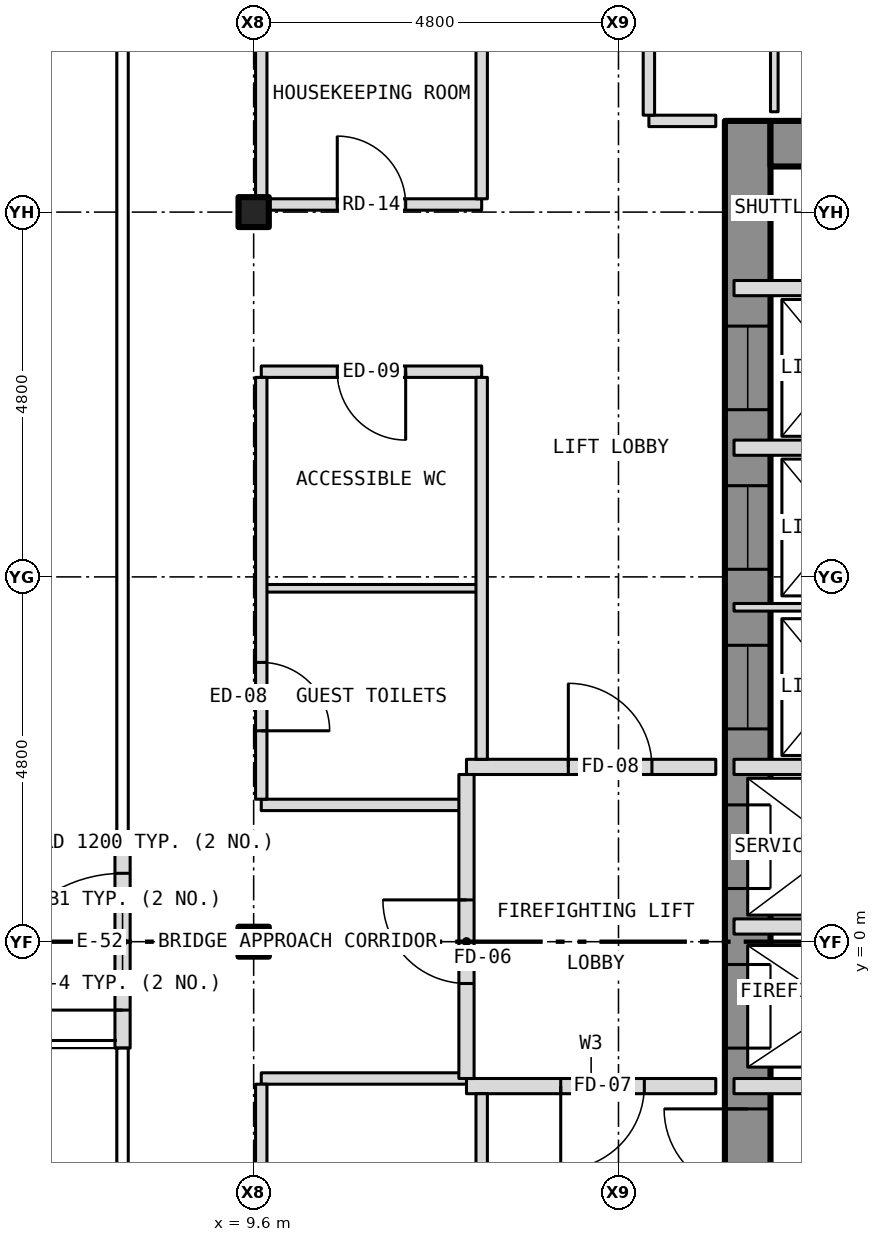
"""IFC4 building model, lengths in metres.
Left out: names, types, materials, properties, quantities, classifications, styles, units other than length and angle.
Written with IfcOpenShell. Run it as: python <this file> out.ifc"""

import sys

from ifc_helpers import new_model, si_unit, direction, frame, frame_2d, origin, origin_2d, place, context, subcontext, project, spatial, rectangle, i_section, extrude, element, fill, save


model = new_model("IFC4")
c1 = context("Model", 3, precision=1e-05, world=origin(), true_north=direction((0.0, 1.0)))
c2 = subcontext(c1, "Body", "Model", "MODEL_VIEW")
j1 = project(units=[si_unit("LENGTHUNIT", "METRE"), si_unit("PLANEANGLEUNIT", "RADIAN")], contexts=[c1])
p1 = place(None, origin())
s1 = spatial("IfcSite", under=j1, at=p1, CompositionType="ELEMENT")
p2 = place(p1, origin())
s2 = spatial("IfcBuilding", under=s1, at=p2, CompositionType="ELEMENT")
p3 = place(p2, frame((0.0, 0.0, 131.0)))
s3 = spatial("IfcBuildingStorey", under=s2, at=p3, CompositionType="ELEMENT", Elevation=131.0)
for number, where, z_axis, x_axis in (
    (1, (9.6, 0.0, -0.15), (0.0, 0.0, 1.0), (1.0, 0.0, 0.0)),
    (2, (9.6, 9.6, -0.15), (0.0, 0.0, 1.0), (1.0, 0.0, 0.0)),
):
    element("IfcColumn", number, at=place(p3, frame(where, z_axis=z_axis, x_axis=x_axis)), inside=s3, PredefinedType="COLUMN", context=c2, shape_type="SweptSolid", body=[
        extrude(i_section(OverallWidth=0.399, OverallDepth=0.394, WebThickness=0.023, FlangeThickness=0.037, at=origin_2d()), origin(), (0.0, 0.0, 1.0), 3.5),
    ])
p4 = place(p3, frame((16.1, -10.8, 0.0), z_axis=(0.0, 0.0, 1.0), x_axis=(0.0, 1.0, 0.0)))
e3 = element("IfcWall", 3, at=p4, inside=s3, PredefinedType="SHEAR", context=c2, shape_type="SweptSolid", body=[
    extrude(rectangle(XDim=21.6, YDim=0.6, at=frame_2d((10.8, 0.0))), origin(), (0.0, 0.0, 1.0), 3.25),
])
p5 = place(p4, frame((9.4, 0.0, 0.0)))
e4 = element("IfcOpeningElement", 4, at=p5, cuts=e3, PredefinedType="OPENING", context=c2, shape_type="SweptSolid", body=[
    extrude(rectangle(XDim=1.1, YDim=2.1, at=frame_2d((0.55, 1.05))), frame((0.0, 0.312, 0.0), z_axis=(0.0, -1.0, 0.0), x_axis=(1.0, 0.0, 0.0)), (0.0, 0.0, 1.0), 0.624),
])
p6 = place(p4, frame((11.5, 0.0, 0.0)))
e5 = element("IfcOpeningElement", 5, at=p6, cuts=e3, PredefinedType="OPENING", context=c2, shape_type="SweptSolid", body=[
    extrude(rectangle(XDim=1.1, YDim=2.1, at=frame_2d((0.55, 1.05))), frame((0.0, 0.312, 0.0), z_axis=(0.0, -1.0, 0.0), x_axis=(1.0, 0.0, 0.0)), (0.0, 0.0, 1.0), 0.624),
])
p7 = place(p4, frame((13.6, 0.0, 0.0)))
e6 = element("IfcOpeningElement", 6, at=p7, cuts=e3, PredefinedType="OPENING", context=c2, shape_type="SweptSolid", body=[
    extrude(rectangle(XDim=1.1, YDim=2.1, at=frame_2d((0.55, 1.05))), frame((0.0, 0.312, 0.0), z_axis=(0.0, -1.0, 0.0), x_axis=(1.0, 0.0, 0.0)), (0.0, 0.0, 1.0), 0.624),
])
p8 = place(p4, frame((15.7, 0.0, 0.0)))
e7 = element("IfcOpeningElement", 7, at=p8, cuts=e3, PredefinedType="OPENING", context=c2, shape_type="SweptSolid", body=[
    extrude(rectangle(XDim=1.1, YDim=2.1, at=frame_2d((0.55, 1.05))), frame((0.0, 0.312, 0.0), z_axis=(0.0, -1.0, 0.0), x_axis=(1.0, 0.0, 0.0)), (0.0, 0.0, 1.0), 0.624),
])
p9 = place(p4, frame((17.8, 0.0, 0.0)))
e8 = element("IfcOpeningElement", 8, at=p9, cuts=e3, PredefinedType="OPENING", context=c2, shape_type="SweptSolid", body=[
    extrude(rectangle(XDim=1.1, YDim=2.1, at=frame_2d((0.55, 1.05))), frame((0.0, 0.312, 0.0), z_axis=(0.0, -1.0, 0.0), x_axis=(1.0, 0.0, 0.0)), (0.0, 0.0, 1.0), 0.624),
])
p10 = place(p4, frame((5.642, 0.0, 0.0)))
e9 = element("IfcOpeningElement", 9, at=p10, cuts=e3, PredefinedType="OPENING", context=c2, shape_type="SweptSolid", body=[
    extrude(rectangle(XDim=1.1, YDim=2.1, at=frame_2d((0.55, 1.05))), frame((0.0, 0.312, 0.0), z_axis=(0.0, -1.0, 0.0), x_axis=(1.0, 0.0, 0.0)), (0.0, 0.0, 1.0), 0.624),
])
p11 = place(p4, frame((7.5, 0.0, 0.0)))
e10 = element("IfcOpeningElement", 10, at=p11, cuts=e3, PredefinedType="OPENING", context=c2, shape_type="SweptSolid", body=[
    extrude(rectangle(XDim=1.1, YDim=2.1, at=frame_2d((0.55, 1.05))), frame((0.0, 0.312, 0.0), z_axis=(0.0, -1.0, 0.0), x_axis=(1.0, 0.0, 0.0)), (0.0, 0.0, 1.0), 0.624),
])
p12 = place(p3, frame((16.4, 10.5, 0.0), z_axis=(0.0, 0.0, 1.0), x_axis=(1.0, 0.0, 0.0)))
e11 = element("IfcWall", 11, at=p12, inside=s3, PredefinedType="SHEAR", context=c2, shape_type="SweptSolid", body=[
    extrude(rectangle(XDim=5.8, YDim=0.6, at=frame_2d((2.9, 0.0))), origin(), (0.0, 0.0, 1.0), 3.25),
])
p13 = place(p3, frame((7.875, -1.4, 0.0), z_axis=(0.0, 0.0, 1.0), x_axis=(0.0, 1.0, 0.0)))
e12 = element("IfcWall", 12, at=p13, inside=s3, PredefinedType="SOLIDWALL", context=c2, shape_type="SweptSolid", body=[
    extrude(rectangle(XDim=2.8, YDim=0.2, at=frame_2d((1.4, 0.0))), origin(), (0.0, 0.0, 1.0), 3.5),
])
p14 = place(p13, frame((0.5, 0.0, 0.0)))
e13 = element("IfcOpeningElement", 13, at=p14, cuts=e12, PredefinedType="OPENING", context=c2, shape_type="SweptSolid", body=[
    extrude(rectangle(XDim=1.8, YDim=2.1, at=frame_2d((0.9, 1.05))), frame((0.0, 0.112, 0.0), z_axis=(0.0, -1.0, 0.0), x_axis=(1.0, 0.0, 0.0)), (0.0, 0.0, 1.0), 0.224),
])
p15 = place(p3, frame((12.4, -1.9, 0.0), z_axis=(0.0, 0.0, 1.0), x_axis=(1.0, 0.0, 0.0)))
e14 = element("IfcWall", 14, at=p15, inside=s3, PredefinedType="PARTITIONING", context=c2, shape_type="SweptSolid", body=[
    extrude(rectangle(XDim=3.28, YDim=0.2, at=frame_2d((1.64, 0.0))), origin(), (0.0, 0.0, 1.0), 3.35),
])
p16 = place(p15, frame((1.24, 0.0, 0.0)))
e15 = element("IfcOpeningElement", 15, at=p16, cuts=e14, PredefinedType="OPENING", context=c2, shape_type="SweptSolid", body=[
    extrude(rectangle(XDim=1.1, YDim=2.1, at=frame_2d((0.55, 1.05))), frame((0.0, 0.112, 0.0), z_axis=(0.0, -1.0, 0.0), x_axis=(1.0, 0.0, 0.0)), (0.0, 0.0, 1.0), 0.224),
])
p17 = place(p3, frame((15.92, -1.9, 0.0), z_axis=(0.0, 0.0, 1.0), x_axis=(1.0, 0.0, 0.0)))
e16 = element("IfcWall", 16, at=p17, inside=s3, PredefinedType="PARTITIONING", context=c2, shape_type="SweptSolid", body=[
    extrude(rectangle(XDim=6.76, YDim=0.2, at=frame_2d((3.38, 0.0))), origin(), (0.0, 0.0, 1.0), 3.25),
])
p18 = place(p17, frame((3.74, 0.0, 0.0)))
e17 = element("IfcOpeningElement", 17, at=p18, cuts=e16, PredefinedType="OPENING", context=c2, shape_type="SweptSolid", body=[
    extrude(rectangle(XDim=0.9, YDim=2.1, at=frame_2d((0.45, 1.05))), frame((0.0, 0.112, 0.0), z_axis=(0.0, -1.0, 0.0), x_axis=(1.0, 0.0, 0.0)), (0.0, 0.0, 1.0), 0.224),
])
p19 = place(p3, frame((9.7, -1.8, 0.0), z_axis=(0.0, 0.0, 1.0), x_axis=(1.0, 0.0, 0.0)))
e18 = element("IfcWall", 18, at=p19, inside=s3, PredefinedType="PARTITIONING", context=c2, shape_type="SweptSolid", body=[
    extrude(rectangle(XDim=2.7, YDim=0.15, at=frame_2d((1.35, 0.0))), origin(), (0.0, 0.0, 1.0), 3.35),
])
p20 = place(p3, frame((15.92, 0.2, 0.0), z_axis=(0.0, 0.0, 1.0), x_axis=(1.0, 0.0, 0.0)))
e19 = element("IfcWall", 19, at=p20, inside=s3, PredefinedType="PARTITIONING", context=c2, shape_type="SweptSolid", body=[
    extrude(rectangle(XDim=2.88, YDim=0.2, at=frame_2d((1.44, 0.0))), origin(), (0.0, 0.0, 1.0), 3.25),
])
p21 = place(p3, frame((9.7, 1.8, 0.0), z_axis=(0.0, 0.0, 1.0), x_axis=(1.0, 0.0, 0.0)))
e20 = element("IfcWall", 20, at=p21, inside=s3, PredefinedType="PARTITIONING", context=c2, shape_type="SweptSolid", body=[
    extrude(rectangle(XDim=2.7, YDim=0.15, at=frame_2d((1.35, 0.0))), origin(), (0.0, 0.0, 1.0), 3.35),
])
p22 = place(p3, frame((12.4, 2.3, 0.0), z_axis=(0.0, 0.0, 1.0), x_axis=(1.0, 0.0, 0.0)))
e21 = element("IfcWall", 21, at=p22, inside=s3, PredefinedType="PARTITIONING", context=c2, shape_type="SweptSolid", body=[
    extrude(rectangle(XDim=3.28, YDim=0.2, at=frame_2d((1.64, 0.0))), origin(), (0.0, 0.0, 1.0), 3.35),
])
p23 = place(p22, frame((1.34, 0.0, 0.0)))
e22 = element("IfcOpeningElement", 22, at=p23, cuts=e21, PredefinedType="OPENING", context=c2, shape_type="SweptSolid", body=[
    extrude(rectangle(XDim=1.1, YDim=2.1, at=frame_2d((0.55, 1.05))), frame((0.0, 0.112, 0.0), z_axis=(0.0, -1.0, 0.0), x_axis=(1.0, 0.0, 0.0)), (0.0, 0.0, 1.0), 0.224),
])
p24 = place(p3, frame((15.92, 2.3, 0.0), z_axis=(0.0, 0.0, 1.0), x_axis=(1.0, 0.0, 0.0)))
e23 = element("IfcWall", 23, at=p24, inside=s3, PredefinedType="PARTITIONING", context=c2, shape_type="SweptSolid", body=[
    extrude(rectangle(XDim=2.88, YDim=0.2, at=frame_2d((1.44, 0.0))), origin(), (0.0, 0.0, 1.0), 3.25),
])
p25 = place(p3, frame((15.92, 4.4, 0.0), z_axis=(0.0, 0.0, 1.0), x_axis=(1.0, 0.0, 0.0)))
e24 = element("IfcWall", 24, at=p25, inside=s3, PredefinedType="PARTITIONING", context=c2, shape_type="SweptSolid", body=[
    extrude(rectangle(XDim=6.76, YDim=0.1, at=frame_2d((3.38, 0.0))), origin(), (0.0, 0.0, 1.0), 3.25),
])
p26 = place(p25, frame((4.43, 0.0, 0.0)))
e25 = element("IfcOpeningElement", 25, at=p26, cuts=e24, PredefinedType="OPENING", context=c2, shape_type="SweptSolid", body=[
    extrude(rectangle(XDim=0.9, YDim=2.1, at=frame_2d((0.45, 1.05))), frame((0.0, 0.062, 0.0), z_axis=(0.0, -1.0, 0.0), x_axis=(1.0, 0.0, 0.0)), (0.0, 0.0, 1.0), 0.124),
])
p27 = place(p3, frame((9.7, 4.65, 0.0), z_axis=(0.0, 0.0, 1.0), x_axis=(1.0, 0.0, 0.0)))
e26 = element("IfcWall", 26, at=p27, inside=s3, PredefinedType="PARTITIONING", context=c2, shape_type="SweptSolid", body=[
    extrude(rectangle(XDim=2.9, YDim=0.1, at=frame_2d((1.45, 0.0))), origin(), (0.0, 0.0, 1.0), 3.35),
])
p28 = place(p3, frame((15.92, 6.5, 0.0), z_axis=(0.0, 0.0, 1.0), x_axis=(1.0, 0.0, 0.0)))
e27 = element("IfcWall", 27, at=p28, inside=s3, PredefinedType="PARTITIONING", context=c2, shape_type="SweptSolid", body=[
    extrude(rectangle(XDim=2.88, YDim=0.2, at=frame_2d((1.44, 0.0))), origin(), (0.0, 0.0, 1.0), 3.25),
])
p29 = place(p3, frame((9.7, 7.5, 0.0), z_axis=(0.0, 0.0, 1.0), x_axis=(1.0, 0.0, 0.0)))
e28 = element("IfcWall", 28, at=p29, inside=s3, PredefinedType="PARTITIONING", context=c2, shape_type="SweptSolid", body=[
    extrude(rectangle(XDim=2.9, YDim=0.15, at=frame_2d((1.45, 0.0))), origin(), (0.0, 0.0, 1.0), 3.35),
])
p30 = place(p29, frame((1.0, 0.0, 0.0)))
e29 = element("IfcOpeningElement", 29, at=p30, cuts=e28, PredefinedType="OPENING", context=c2, shape_type="SweptSolid", body=[
    extrude(rectangle(XDim=0.9, YDim=2.1, at=frame_2d((0.45, 1.05))), frame((0.0, 0.087, 0.0), z_axis=(0.0, -1.0, 0.0), x_axis=(1.0, 0.0, 0.0)), (0.0, 0.0, 1.0), 0.174),
])
p31 = place(p3, frame((15.92, 8.6, 0.0), z_axis=(0.0, 0.0, 1.0), x_axis=(1.0, 0.0, 0.0)))
e30 = element("IfcWall", 30, at=p31, inside=s3, PredefinedType="PARTITIONING", context=c2, shape_type="SweptSolid", body=[
    extrude(rectangle(XDim=2.88, YDim=0.2, at=frame_2d((1.44, 0.0))), origin(), (0.0, 0.0, 1.0), 3.25),
])
p32 = place(p3, frame((9.7, 9.7, 0.0), z_axis=(0.0, 0.0, 1.0), x_axis=(1.0, 0.0, 0.0)))
e31 = element("IfcWall", 31, at=p32, inside=s3, PredefinedType="PARTITIONING", context=c2, shape_type="SweptSolid", body=[
    extrude(rectangle(XDim=2.9, YDim=0.15, at=frame_2d((1.45, 0.0))), origin(), (0.0, 0.0, 1.0), 2.728),
])
p33 = place(p32, frame((1.0, 0.0, 0.0)))
e32 = element("IfcOpeningElement", 32, at=p33, cuts=e31, PredefinedType="OPENING", context=c2, shape_type="SweptSolid", body=[
    extrude(rectangle(XDim=0.9, YDim=2.1, at=frame_2d((0.45, 1.05))), frame((0.0, 0.087, 0.0), z_axis=(0.0, -1.0, 0.0), x_axis=(1.0, 0.0, 0.0)), (0.0, 0.0, 1.0), 0.174),
])
p34 = place(p3, frame((14.8, 10.8, 0.0), z_axis=(0.0, 0.0, 1.0), x_axis=(1.0, 0.0, 0.0)))
e33 = element("IfcWall", 33, at=p34, inside=s3, PredefinedType="PARTITIONING", context=c2, shape_type="SweptSolid", body=[
    extrude(rectangle(XDim=0.88, YDim=0.15, at=frame_2d((0.44, 0.0))), origin(), (0.0, 0.0, 1.0), 3.35),
])
p35 = place(p3, frame((9.7, -9.401, 0.0), z_axis=(0.0, 0.0, 1.0), x_axis=(0.0, 1.0, 0.0)))
e34 = element("IfcWall", 34, at=p35, inside=s3, PredefinedType="PARTITIONING", context=c2, shape_type="SweptSolid", body=[
    extrude(rectangle(XDim=7.526, YDim=0.15, at=frame_2d((3.763, 0.0))), origin(), (0.0, 0.0, 1.0), 2.728),
])
p36 = place(p35, frame((1.751, 0.0, 0.0)))
e35 = element("IfcOpeningElement", 35, at=p36, cuts=e34, PredefinedType="OPENING", context=c2, shape_type="SweptSolid", body=[
    extrude(rectangle(XDim=0.9, YDim=2.1, at=frame_2d((0.45, 1.05))), frame((0.0, 0.087, 0.0), z_axis=(0.0, -1.0, 0.0), x_axis=(1.0, 0.0, 0.0)), (0.0, 0.0, 1.0), 0.174),
])
p37 = place(p3, frame((9.7, 1.875, 0.0), z_axis=(0.0, 0.0, 1.0), x_axis=(0.0, 1.0, 0.0)))
e36 = element("IfcWall", 36, at=p37, inside=s3, PredefinedType="PARTITIONING", context=c2, shape_type="SweptSolid", body=[
    extrude(rectangle(XDim=5.55, YDim=0.15, at=frame_2d((2.775, 0.0))), origin(), (0.0, 0.0, 1.0), 2.728),
])
p38 = place(p37, frame((0.9, 0.0, 0.0)))
e37 = element("IfcOpeningElement", 37, at=p38, cuts=e36, PredefinedType="OPENING", context=c2, shape_type="SweptSolid", body=[
    extrude(rectangle(XDim=0.9, YDim=2.1, at=frame_2d((0.45, 1.05))), frame((0.0, 0.087, 0.0), z_axis=(0.0, -1.0, 0.0), x_axis=(1.0, 0.0, 0.0)), (0.0, 0.0, 1.0), 0.174),
])
p39 = place(p3, frame((9.7, 9.775, 0.0), z_axis=(0.0, 0.0, 1.0), x_axis=(0.0, 1.0, 0.0)))
e38 = element("IfcWall", 38, at=p39, inside=s3, PredefinedType="PARTITIONING", context=c2, shape_type="SweptSolid", body=[
    extrude(rectangle(XDim=2.75, YDim=0.15, at=frame_2d((1.375, 0.0))), origin(), (0.0, 0.0, 1.0), 2.728),
])
p40 = place(p3, frame((12.4, -1.8, 0.0), z_axis=(0.0, 0.0, 1.0), x_axis=(0.0, 1.0, 0.0)))
e39 = element("IfcWall", 39, at=p40, inside=s3, PredefinedType="PARTITIONING", context=c2, shape_type="SweptSolid", body=[
    extrude(rectangle(XDim=4.0, YDim=0.2, at=frame_2d((2.0, 0.0))), origin(), (0.0, 0.0, 1.0), 3.35),
])
p41 = place(p40, frame((1.25, 0.0, 0.0)))
e40 = element("IfcOpeningElement", 40, at=p41, cuts=e39, PredefinedType="OPENING", context=c2, shape_type="SweptSolid", body=[
    extrude(rectangle(XDim=1.1, YDim=2.1, at=frame_2d((0.55, 1.05))), frame((0.0, 0.112, 0.0), z_axis=(0.0, -1.0, 0.0), x_axis=(1.0, 0.0, 0.0)), (0.0, 0.0, 1.0), 0.224),
])
p42 = place(p3, frame((12.6, -12.525, 0.0), z_axis=(0.0, 0.0, 1.0), x_axis=(0.0, 1.0, 0.0)))
e41 = element("IfcWall", 41, at=p42, inside=s3, PredefinedType="PARTITIONING", context=c2, shape_type="SweptSolid", body=[
    extrude(rectangle(XDim=10.525, YDim=0.15, at=frame_2d((5.262, 0.0))), origin(), (0.0, 0.0, 1.0), 3.35),
])
p43 = place(p3, frame((12.6, 2.4, 0.0), z_axis=(0.0, 0.0, 1.0), x_axis=(0.0, 1.0, 0.0)))
e42 = element("IfcWall", 42, at=p43, inside=s3, PredefinedType="PARTITIONING", context=c2, shape_type="SweptSolid", body=[
    extrude(rectangle(XDim=5.025, YDim=0.15, at=frame_2d((2.513, 0.0))), origin(), (0.0, 0.0, 1.0), 3.35),
])
p44 = place(p3, frame((12.6, 9.775, 0.0), z_axis=(0.0, 0.0, 1.0), x_axis=(0.0, 1.0, 0.0)))
e43 = element("IfcWall", 43, at=p44, inside=s3, PredefinedType="PARTITIONING", context=c2, shape_type="SweptSolid", body=[
    extrude(rectangle(XDim=2.75, YDim=0.15, at=frame_2d((1.375, 0.0))), origin(), (0.0, 0.0, 1.0), 3.35),
])
p45 = place(p3, frame((14.8, 10.875, 0.0), z_axis=(0.0, 0.0, 1.0), x_axis=(0.0, 1.0, 0.0)))
e44 = element("IfcWall", 44, at=p45, inside=s3, PredefinedType="PARTITIONING", context=c2, shape_type="SweptSolid", body=[
    extrude(rectangle(XDim=3.85, YDim=0.15, at=frame_2d((1.925, 0.0))), origin(), (0.0, 0.0, 1.0), 3.35),
])
p46 = place(p45, frame((2.325, 0.0, 0.0)))
e45 = element("IfcOpeningElement", 45, at=p46, cuts=e44, PredefinedType="OPENING", context=c2, shape_type="SweptSolid", body=[
    extrude(rectangle(XDim=1.0, YDim=2.1, at=frame_2d((0.5, 1.05))), frame((0.0, 0.087, 0.0), z_axis=(0.0, -1.0, 0.0), x_axis=(1.0, 0.0, 0.0)), (0.0, 0.0, 1.0), 0.174),
])
p47 = place(p3, frame((16.45, 10.92, 0.0), z_axis=(0.0, 0.0, 1.0), x_axis=(0.0, 1.0, 0.0)))
e46 = element("IfcWall", 46, at=p47, inside=s3, PredefinedType="PARTITIONING", context=c2, shape_type="SweptSolid", body=[
    extrude(rectangle(XDim=12.36, YDim=0.1, at=frame_2d((6.18, 0.0))), origin(), (0.0, 0.0, 1.0), 3.35),
])
p48 = place(p47, frame((5.43, 0.0, 0.0)))
e47 = element("IfcOpeningElement", 47, at=p48, cuts=e46, PredefinedType="OPENING", context=c2, shape_type="SweptSolid", body=[
    extrude(rectangle(XDim=0.9, YDim=2.1, at=frame_2d((0.45, 1.05))), frame((0.0, 0.062, 0.0), z_axis=(0.0, -1.0, 0.0), x_axis=(1.0, 0.0, 0.0)), (0.0, 0.0, 1.0), 0.124),
])
p49 = place(p14, origin())
e48 = element("IfcDoor", 48, at=p49, inside=s3, OperationType="DOUBLE_DOOR_DOUBLE_SWING", PredefinedType="DOOR", context=c2, shape_type="SweptSolid", body=[
    extrude(rectangle(XDim=1.8, YDim=2.1, at=frame_2d((0.9, 1.05))), frame((0.0, 0.025, 0.0), z_axis=(0.0, -1.0, 0.0), x_axis=(1.0, 0.0, 0.0)), (0.0, 0.0, 1.0), 0.05),
])
fill(e13, e48)
p50 = place(p5, origin())
e49 = element("IfcDoor", 49, at=p50, inside=s3, OperationType="SLIDING_TO_LEFT", PredefinedType="DOOR", context=c2, shape_type="SweptSolid", body=[
    extrude(rectangle(XDim=1.1, YDim=2.1, at=frame_2d((0.55, 1.05))), frame((0.0, 0.025, 0.0), z_axis=(0.0, -1.0, 0.0), x_axis=(1.0, 0.0, 0.0)), (0.0, 0.0, 1.0), 0.05),
])
fill(e4, e49)
p51 = place(p6, origin())
e50 = element("IfcDoor", 50, at=p51, inside=s3, OperationType="SLIDING_TO_LEFT", PredefinedType="DOOR", context=c2, shape_type="SweptSolid", body=[
    extrude(rectangle(XDim=1.1, YDim=2.1, at=frame_2d((0.55, 1.05))), frame((0.0, 0.025, 0.0), z_axis=(0.0, -1.0, 0.0), x_axis=(1.0, 0.0, 0.0)), (0.0, 0.0, 1.0), 0.05),
])
fill(e5, e50)
p52 = place(p7, origin())
e51 = element("IfcDoor", 51, at=p52, inside=s3, OperationType="SLIDING_TO_LEFT", PredefinedType="DOOR", context=c2, shape_type="SweptSolid", body=[
    extrude(rectangle(XDim=1.1, YDim=2.1, at=frame_2d((0.55, 1.05))), frame((0.0, 0.025, 0.0), z_axis=(0.0, -1.0, 0.0), x_axis=(1.0, 0.0, 0.0)), (0.0, 0.0, 1.0), 0.05),
])
fill(e6, e51)
p53 = place(p8, origin())
e52 = element("IfcDoor", 52, at=p53, inside=s3, OperationType="SLIDING_TO_LEFT", PredefinedType="DOOR", context=c2, shape_type="SweptSolid", body=[
    extrude(rectangle(XDim=1.1, YDim=2.1, at=frame_2d((0.55, 1.05))), frame((0.0, 0.025, 0.0), z_axis=(0.0, -1.0, 0.0), x_axis=(1.0, 0.0, 0.0)), (0.0, 0.0, 1.0), 0.05),
])
fill(e7, e52)
p54 = place(p9, origin())
e53 = element("IfcDoor", 53, at=p54, inside=s3, OperationType="SLIDING_TO_LEFT", PredefinedType="DOOR", context=c2, shape_type="SweptSolid", body=[
    extrude(rectangle(XDim=1.1, YDim=2.1, at=frame_2d((0.55, 1.05))), frame((0.0, 0.025, 0.0), z_axis=(0.0, -1.0, 0.0), x_axis=(1.0, 0.0, 0.0)), (0.0, 0.0, 1.0), 0.05),
])
fill(e8, e53)
p55 = place(p11, origin())
e54 = element("IfcDoor", 54, at=p55, inside=s3, OperationType="SINGLE_SWING_RIGHT", PredefinedType="DOOR", context=c2, shape_type="SweptSolid", body=[
    extrude(rectangle(XDim=1.1, YDim=2.1, at=frame_2d((0.55, 1.05))), frame((0.0, 0.025, 0.0), z_axis=(0.0, -1.0, 0.0), x_axis=(1.0, 0.0, 0.0)), (0.0, 0.0, 1.0), 0.05),
])
fill(e10, e54)
p56 = place(p41, origin())
e55 = element("IfcDoor", 55, at=p56, inside=s3, OperationType="SINGLE_SWING_RIGHT", PredefinedType="DOOR", context=c2, shape_type="SweptSolid", body=[
    extrude(rectangle(XDim=1.1, YDim=2.1, at=frame_2d((0.55, 1.05))), frame((0.0, 0.025, 0.0), z_axis=(0.0, -1.0, 0.0), x_axis=(1.0, 0.0, 0.0)), (0.0, 0.0, 1.0), 0.05),
])
fill(e40, e55)
p57 = place(p16, origin())
e56 = element("IfcDoor", 56, at=p57, inside=s3, OperationType="SINGLE_SWING_LEFT", PredefinedType="DOOR", context=c2, shape_type="SweptSolid", body=[
    extrude(rectangle(XDim=1.1, YDim=2.1, at=frame_2d((0.55, 1.05))), frame((0.0, 0.025, 0.0), z_axis=(0.0, -1.0, 0.0), x_axis=(1.0, 0.0, 0.0)), (0.0, 0.0, 1.0), 0.05),
])
fill(e15, e56)
p58 = place(p23, origin())
e57 = element("IfcDoor", 57, at=p58, inside=s3, OperationType="SINGLE_SWING_LEFT", PredefinedType="DOOR", context=c2, shape_type="SweptSolid", body=[
    extrude(rectangle(XDim=1.1, YDim=2.1, at=frame_2d((0.55, 1.05))), frame((0.0, 0.025, 0.0), z_axis=(0.0, -1.0, 0.0), x_axis=(1.0, 0.0, 0.0)), (0.0, 0.0, 1.0), 0.05),
])
fill(e22, e57)
p59 = place(p33, origin())
e58 = element("IfcDoor", 58, at=p59, inside=s3, OperationType="SINGLE_SWING_LEFT", PredefinedType="DOOR", context=c2, shape_type="SweptSolid", body=[
    extrude(rectangle(XDim=0.9, YDim=2.1, at=frame_2d((0.45, 1.05))), frame((0.0, 0.025, 0.0), z_axis=(0.0, -1.0, 0.0), x_axis=(1.0, 0.0, 0.0)), (0.0, 0.0, 1.0), 0.05),
])
fill(e32, e58)
p60 = place(p38, origin())
e59 = element("IfcDoor", 59, at=p60, inside=s3, OperationType="SINGLE_SWING_LEFT", PredefinedType="DOOR", context=c2, shape_type="SweptSolid", body=[
    extrude(rectangle(XDim=0.9, YDim=2.1, at=frame_2d((0.45, 1.05))), frame((0.0, 0.025, 0.0), z_axis=(0.0, -1.0, 0.0), x_axis=(1.0, 0.0, 0.0)), (0.0, 0.0, 1.0), 0.05),
])
fill(e37, e59)
p61 = place(p30, origin())
e60 = element("IfcDoor", 60, at=p61, inside=s3, OperationType="SINGLE_SWING_RIGHT", PredefinedType="DOOR", context=c2, shape_type="SweptSolid", body=[
    extrude(rectangle(XDim=0.9, YDim=2.1, at=frame_2d((0.45, 1.05))), frame((0.0, 0.025, 0.0), z_axis=(0.0, -1.0, 0.0), x_axis=(1.0, 0.0, 0.0)), (0.0, 0.0, 1.0), 0.05),
])
fill(e29, e60)
save(model, sys.argv[1])
